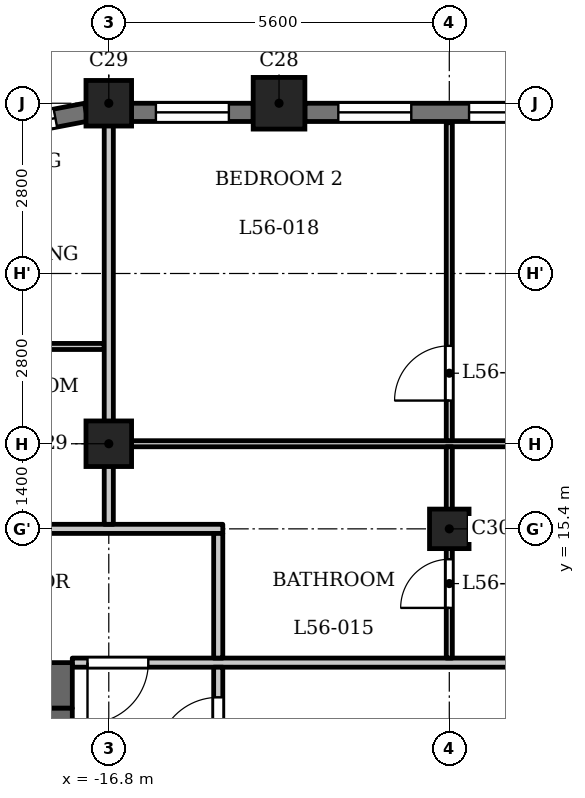
"""IFC4 building model, lengths in metres.
Left out: names, types, materials, properties, quantities, classifications, styles, units other than length and angle.
Written with IfcOpenShell. Run it as: python <this file> out.ifc"""

import sys

from ifc_helpers import new_model, si_unit, direction, frame, frame_2d, origin, origin_2d, place, context, subcontext, project, spatial, rectangle, extrude, element, fill, save


model = new_model("IFC4")
c1 = context("Model", 3, precision=1e-05, world=origin(), true_north=direction((0.0, 1.0)))
c2 = subcontext(c1, "Body", "Model", "MODEL_VIEW")
j1 = project(units=[si_unit("LENGTHUNIT", "METRE"), si_unit("PLANEANGLEUNIT", "RADIAN")], contexts=[c1])
p1 = place(None, origin())
s1 = spatial("IfcSite", under=j1, at=p1, CompositionType="ELEMENT")
p2 = place(p1, origin())
s2 = spatial("IfcBuilding", under=s1, at=p2, CompositionType="ELEMENT")
p3 = place(p2, frame((0.0, 0.0, 216.9)))
s3 = spatial("IfcBuildingStorey", under=s2, at=p3, CompositionType="ELEMENT", Elevation=216.9)
p4 = place(p3, frame((-14.0, 22.4, 0.0), z_axis=(0.0, 0.0, 1.0), x_axis=(1.0, 0.0, 0.0)))
e1 = element("IfcColumn", 1, at=p4, inside=s3, PredefinedType="COLUMN", context=c2, shape_type="SweptSolid", body=[
    extrude(rectangle(XDim=0.85, YDim=0.85, at=origin_2d()), origin(), (0.0, 0.0, 1.0), 3.5),
])
for number, where, z_axis, x_axis in (
    (2, (-16.8, 16.8, 0.0), (0.0, 0.0, 1.0), (1.0, 0.0, 0.0)),
    (3, (-16.8, 22.4, 0.0), (0.0, 0.0, 1.0), (1.0, 0.0, 0.0)),
):
    element("IfcColumn", number, at=place(p3, frame(where, z_axis=z_axis, x_axis=x_axis)), inside=s3, PredefinedType="COLUMN", context=c2, shape_type="SweptSolid", body=[
        extrude(rectangle(XDim=0.75, YDim=0.75, at=origin_2d()), origin(), (0.0, 0.0, 1.0), 3.5),
    ])
p5 = place(p3, frame((-11.2, 15.4, 0.0), z_axis=(0.0, 0.0, 1.0), x_axis=(1.0, 0.0, 0.0)))
e4 = element("IfcColumn", 4, at=p5, inside=s3, PredefinedType="COLUMN", context=c2, shape_type="SweptSolid", body=[
    extrude(rectangle(XDim=0.65, YDim=0.65, at=origin_2d()), origin(), (0.0, 0.0, 1.0), 3.5),
])
p6 = place(p3, frame((-8.825, 22.25, 0.0), z_axis=(0.0, 0.0, 1.0), x_axis=(-1.0, 0.0, 0.0)))
e5 = element("IfcWall", 5, at=p6, inside=s3, PredefinedType="SOLIDWALL", context=c2, shape_type="SweptSolid", body=[
    extrude(rectangle(XDim=4.75, YDim=0.3, at=frame_2d((2.375, 0.0))), origin(), (0.0, 0.0, 1.0), 2.5),
])
p7 = place(p6, frame((0.25, 0.0, 0.9)))
e6 = element("IfcOpeningElement", 6, at=p7, cuts=e5, PredefinedType="OPENING", context=c2, shape_type="SweptSolid", body=[
    extrude(rectangle(XDim=1.8, YDim=1.25, at=frame_2d((0.9, 0.625))), frame((0.0, 0.16, 0.0), z_axis=(0.0, -1.0, 0.0), x_axis=(1.0, 0.0, 0.0)), (0.0, 0.0, 1.0), 0.32),
])
p8 = place(p6, frame((3.0, 0.0, 0.6)))
e7 = element("IfcOpeningElement", 7, at=p8, cuts=e5, PredefinedType="OPENING", context=c2, shape_type="SweptSolid", body=[
    extrude(rectangle(XDim=1.2, YDim=1.55, at=frame_2d((0.6, 0.775))), frame((0.0, 0.16, 0.0), z_axis=(0.0, -1.0, 0.0), x_axis=(1.0, 0.0, 0.0)), (0.0, 0.0, 1.0), 0.32),
])
p9 = place(p3, frame((-14.425, 22.25, 0.0), z_axis=(0.0, 0.0, 1.0), x_axis=(-1.0, 0.0, 0.0)))
e8 = element("IfcWall", 8, at=p9, inside=s3, PredefinedType="SOLIDWALL", context=c2, shape_type="SweptSolid", body=[
    extrude(rectangle(XDim=2.0, YDim=0.3, at=frame_2d((1.0, 0.0))), origin(), (0.0, 0.0, 1.0), 2.5),
])
p10 = place(p9, frame((0.4, 0.0, 0.6)))
e9 = element("IfcOpeningElement", 9, at=p10, cuts=e8, PredefinedType="OPENING", context=c2, shape_type="SweptSolid", body=[
    extrude(rectangle(XDim=1.2, YDim=1.55, at=frame_2d((0.6, 0.775))), frame((0.0, 0.16, 0.0), z_axis=(0.0, -1.0, 0.0), x_axis=(1.0, 0.0, 0.0)), (0.0, 0.0, 1.0), 0.32),
])
p11 = place(p3, frame((-17.172, 22.253, 0.0), z_axis=(0.0, 0.0, 1.0), x_axis=(-0.982300037503, -0.187314271538, 0.0)))
e10 = element("IfcWall", 10, at=p11, inside=s3, PredefinedType="SOLIDWALL", context=c2, shape_type="SweptSolid", body=[
    extrude(rectangle(XDim=1.831, YDim=0.3, at=frame_2d((0.916, 0.0))), origin(), (0.0, 0.0, 1.0), 2.5),
])
p12 = place(p11, frame((0.516, 0.0, 0.6)))
e11 = element("IfcOpeningElement", 11, at=p12, cuts=e10, PredefinedType="OPENING", context=c2, shape_type="SweptSolid", body=[
    extrude(rectangle(XDim=0.8, YDim=1.55, at=frame_2d((0.4, 0.775))), frame((0.0, 0.16, 0.0), z_axis=(0.0, -1.0, 0.0), x_axis=(1.0, 0.0, 0.0)), (0.0, 0.0, 1.0), 0.32),
])
p13 = place(p3, frame((-17.4, 12.825, 0.0), z_axis=(0.0, 0.0, 1.0), x_axis=(-1.0, 0.0, 0.0)))
e12 = element("IfcWall", 12, at=p13, inside=s3, PredefinedType="SHEAR", context=c2, shape_type="SweptSolid", body=[
    extrude(rectangle(XDim=7.6, YDim=0.75, at=frame_2d((3.8, 0.0))), origin(), (0.0, 0.0, 1.0), 3.2),
])
p14 = place(p3, frame((-17.6, -12.45, 0.0), z_axis=(0.0, 0.0, 1.0), x_axis=(0.0, 1.0, 0.0)))
e13 = element("IfcWall", 13, at=p14, inside=s3, PredefinedType="SHEAR", context=c2, shape_type="SweptSolid", body=[
    extrude(rectangle(XDim=24.9, YDim=0.4, at=frame_2d((12.45, 0.0))), origin(), (0.0, 0.0, 1.0), 3.2),
])
p15 = place(p14, frame((6.85, 0.0, 0.0)))
e14 = element("IfcOpeningElement", 14, at=p15, cuts=e13, PredefinedType="OPENING", context=c2, shape_type="SweptSolid", body=[
    extrude(rectangle(XDim=0.9, YDim=2.1, at=frame_2d((0.45, 1.05))), frame((0.0, 0.21, 0.0), z_axis=(0.0, -1.0, 0.0), x_axis=(1.0, 0.0, 0.0)), (0.0, 0.0, 1.0), 0.42),
])
p16 = place(p14, frame((10.45, 0.0, 0.0)))
e15 = element("IfcOpeningElement", 15, at=p16, cuts=e13, PredefinedType="OPENING", context=c2, shape_type="SweptSolid", body=[
    extrude(rectangle(XDim=0.9, YDim=2.1, at=frame_2d((0.45, 1.05))), frame((0.0, 0.21, 0.0), z_axis=(0.0, -1.0, 0.0), x_axis=(1.0, 0.0, 0.0)), (0.0, 0.0, 1.0), 0.42),
])
p17 = place(p14, frame((15.6, 0.0, 0.0)))
e16 = element("IfcOpeningElement", 16, at=p17, cuts=e13, PredefinedType="OPENING", context=c2, shape_type="SweptSolid", body=[
    extrude(rectangle(XDim=1.1, YDim=2.1, at=frame_2d((0.55, 1.05))), frame((0.0, 0.21, 0.0), z_axis=(0.0, -1.0, 0.0), x_axis=(1.0, 0.0, 0.0)), (0.0, 0.0, 1.0), 0.42),
])
p18 = place(p14, frame((18.0, 0.0, 0.0)))
e17 = element("IfcOpeningElement", 17, at=p18, cuts=e13, PredefinedType="OPENING", context=c2, shape_type="SweptSolid", body=[
    extrude(rectangle(XDim=1.1, YDim=2.1, at=frame_2d((0.55, 1.05))), frame((0.0, 0.21, 0.0), z_axis=(0.0, -1.0, 0.0), x_axis=(1.0, 0.0, 0.0)), (0.0, 0.0, 1.0), 0.42),
])
p19 = place(p14, frame((23.025, 0.0, 0.0)))
e18 = element("IfcOpeningElement", 18, at=p19, cuts=e13, PredefinedType="OPENING", context=c2, shape_type="SweptSolid", body=[
    extrude(rectangle(XDim=1.1, YDim=2.1, at=frame_2d((0.55, 1.05))), frame((0.0, 0.21, 0.0), z_axis=(0.0, -1.0, 0.0), x_axis=(1.0, 0.0, 0.0)), (0.0, 0.0, 1.0), 0.42),
])
p20 = place(p14, frame((0.775, 0.0, 0.0)))
e19 = element("IfcOpeningElement", 19, at=p20, cuts=e13, PredefinedType="OPENING", context=c2, shape_type="SweptSolid", body=[
    extrude(rectangle(XDim=1.1, YDim=2.1, at=frame_2d((0.55, 1.05))), frame((0.0, 0.21, 0.0), z_axis=(0.0, -1.0, 0.0), x_axis=(1.0, 0.0, 0.0)), (0.0, 0.0, 1.0), 0.42),
])
p21 = place(p14, frame((12.925, 0.0, 0.0)))
e20 = element("IfcOpeningElement", 20, at=p21, cuts=e13, PredefinedType="OPENING", context=c2, shape_type="SweptSolid", body=[
    extrude(rectangle(XDim=1.8, YDim=2.1, at=frame_2d((0.9, 1.05))), frame((0.0, 0.21, 0.0), z_axis=(0.0, -1.0, 0.0), x_axis=(1.0, 0.0, 0.0)), (0.0, 0.0, 1.0), 0.42),
])
p22 = place(p3, frame((-17.4, 13.2, 0.0), z_axis=(0.0, 0.0, 1.0), x_axis=(1.0, 0.0, 0.0)))
e21 = element("IfcWall", 21, at=p22, inside=s3, PredefinedType="PARTITIONING", context=c2, shape_type="SweptSolid", body=[
    extrude(rectangle(XDim=34.8, YDim=0.15, at=frame_2d((17.4, 0.0))), origin(), (0.0, 0.0, 1.0), 3.2),
])
p23 = place(p22, frame((0.25, 0.0, 0.0)))
e22 = element("IfcOpeningElement", 22, at=p23, cuts=e21, PredefinedType="OPENING", context=c2, shape_type="SweptSolid", body=[
    extrude(rectangle(XDim=1.0, YDim=2.1, at=frame_2d((0.5, 1.05))), frame((0.0, 0.085, 0.0), z_axis=(0.0, -1.0, 0.0), x_axis=(1.0, 0.0, 0.0)), (0.0, 0.0, 1.0), 0.17),
])
p24 = place(p22, frame((33.65, 0.0, 0.0)))
e23 = element("IfcOpeningElement", 23, at=p24, cuts=e21, PredefinedType="OPENING", context=c2, shape_type="SweptSolid", body=[
    extrude(rectangle(XDim=1.0, YDim=2.1, at=frame_2d((0.5, 1.05))), frame((0.0, 0.085, 0.0), z_axis=(0.0, -1.0, 0.0), x_axis=(1.0, 0.0, 0.0)), (0.0, 0.0, 1.0), 0.17),
])
p25 = place(p22, frame((15.75, 0.0, 0.0)))
e24 = element("IfcOpeningElement", 24, at=p25, cuts=e21, PredefinedType="OPENING", context=c2, shape_type="SweptSolid", body=[
    extrude(rectangle(XDim=1.0, YDim=2.1, at=frame_2d((0.5, 1.05))), frame((0.0, 0.085, 0.0), z_axis=(0.0, -1.0, 0.0), x_axis=(1.0, 0.0, 0.0)), (0.0, 0.0, 1.0), 0.17),
])
p26 = place(p22, frame((26.95, 0.0, 0.0)))
e25 = element("IfcOpeningElement", 25, at=p26, cuts=e21, PredefinedType="OPENING", context=c2, shape_type="SweptSolid", body=[
    extrude(rectangle(XDim=1.0, YDim=2.1, at=frame_2d((0.5, 1.05))), frame((0.0, 0.085, 0.0), z_axis=(0.0, -1.0, 0.0), x_axis=(1.0, 0.0, 0.0)), (0.0, 0.0, 1.0), 0.17),
])
p27 = place(p22, frame((29.75, 0.0, 0.0)))
e26 = element("IfcOpeningElement", 26, at=p27, cuts=e21, PredefinedType="OPENING", context=c2, shape_type="SweptSolid", body=[
    extrude(rectangle(XDim=1.0, YDim=2.1, at=frame_2d((0.5, 1.05))), frame((0.0, 0.085, 0.0), z_axis=(0.0, -1.0, 0.0), x_axis=(1.0, 0.0, 0.0)), (0.0, 0.0, 1.0), 0.17),
])
p28 = place(p3, frame((-24.684, 15.4, 0.0), z_axis=(0.0, 0.0, 1.0), x_axis=(1.0, 0.0, 0.0)))
e27 = element("IfcWall", 27, at=p28, inside=s3, PredefinedType="PARTITIONING", context=c2, shape_type="SweptSolid", body=[
    extrude(rectangle(XDim=9.759, YDim=0.15, at=frame_2d((4.879, 0.0))), origin(), (0.0, 0.0, 1.0), 3.2),
])
p29 = place(p28, frame((0.984, 0.0, 0.0)))
e28 = element("IfcOpeningElement", 28, at=p29, cuts=e27, PredefinedType="OPENING", context=c2, shape_type="SweptSolid", body=[
    extrude(rectangle(XDim=1.0, YDim=2.1, at=frame_2d((0.5, 1.05))), frame((0.0, 0.085, 0.0), z_axis=(0.0, -1.0, 0.0), x_axis=(1.0, 0.0, 0.0)), (0.0, 0.0, 1.0), 0.17),
])
p30 = place(p3, frame((-16.725, 16.8, 0.0), z_axis=(0.0, 0.0, 1.0), x_axis=(1.0, 0.0, 0.0)))
e29 = element("IfcWall", 29, at=p30, inside=s3, PredefinedType="PARTITIONING", context=c2, shape_type="SweptSolid", body=[
    extrude(rectangle(XDim=33.45, YDim=0.1, at=frame_2d((16.725, 0.0))), origin(), (0.0, 0.0, 1.0), 3.2),
])
p31 = place(p30, frame((11.675, 0.0, 0.0)))
e30 = element("IfcOpeningElement", 30, at=p31, cuts=e29, PredefinedType="OPENING", context=c2, shape_type="SweptSolid", body=[
    extrude(rectangle(XDim=0.9, YDim=2.1, at=frame_2d((0.45, 1.05))), frame((0.0, 0.06, 0.0), z_axis=(0.0, -1.0, 0.0), x_axis=(1.0, 0.0, 0.0)), (0.0, 0.0, 1.0), 0.12),
])
p32 = place(p30, frame((9.575, 0.0, 0.0)))
e31 = element("IfcOpeningElement", 31, at=p32, cuts=e29, PredefinedType="OPENING", context=c2, shape_type="SweptSolid", body=[
    extrude(rectangle(XDim=0.9, YDim=2.1, at=frame_2d((0.45, 1.05))), frame((0.0, 0.06, 0.0), z_axis=(0.0, -1.0, 0.0), x_axis=(1.0, 0.0, 0.0)), (0.0, 0.0, 1.0), 0.12),
])
p33 = place(p30, frame((17.375, 0.0, 0.0)))
e32 = element("IfcOpeningElement", 32, at=p33, cuts=e29, PredefinedType="OPENING", context=c2, shape_type="SweptSolid", body=[
    extrude(rectangle(XDim=0.8, YDim=2.1, at=frame_2d((0.4, 1.05))), frame((0.0, 0.06, 0.0), z_axis=(0.0, -1.0, 0.0), x_axis=(1.0, 0.0, 0.0)), (0.0, 0.0, 1.0), 0.12),
])
p34 = place(p30, frame((19.525, 0.0, 0.0)))
e33 = element("IfcOpeningElement", 33, at=p34, cuts=e29, PredefinedType="OPENING", context=c2, shape_type="SweptSolid", body=[
    extrude(rectangle(XDim=0.9, YDim=2.1, at=frame_2d((0.45, 1.05))), frame((0.0, 0.06, 0.0), z_axis=(0.0, -1.0, 0.0), x_axis=(1.0, 0.0, 0.0)), (0.0, 0.0, 1.0), 0.12),
])
p35 = place(p30, frame((23.775, 0.0, 0.0)))
e34 = element("IfcOpeningElement", 34, at=p35, cuts=e29, PredefinedType="OPENING", context=c2, shape_type="SweptSolid", body=[
    extrude(rectangle(XDim=0.9, YDim=2.1, at=frame_2d((0.45, 1.05))), frame((0.0, 0.06, 0.0), z_axis=(0.0, -1.0, 0.0), x_axis=(1.0, 0.0, 0.0)), (0.0, 0.0, 1.0), 0.12),
])
p36 = place(p30, frame((26.125, 0.0, 0.0)))
e35 = element("IfcOpeningElement", 35, at=p36, cuts=e29, PredefinedType="OPENING", context=c2, shape_type="SweptSolid", body=[
    extrude(rectangle(XDim=0.9, YDim=2.1, at=frame_2d((0.45, 1.05))), frame((0.0, 0.06, 0.0), z_axis=(0.0, -1.0, 0.0), x_axis=(1.0, 0.0, 0.0)), (0.0, 0.0, 1.0), 0.12),
])
p37 = place(p30, frame((32.075, 0.0, 0.0)))
e36 = element("IfcOpeningElement", 36, at=p37, cuts=e29, PredefinedType="OPENING", context=c2, shape_type="SweptSolid", body=[
    extrude(rectangle(XDim=0.8, YDim=2.1, at=frame_2d((0.4, 1.05))), frame((0.0, 0.06, 0.0), z_axis=(0.0, -1.0, 0.0), x_axis=(1.0, 0.0, 0.0)), (0.0, 0.0, 1.0), 0.12),
])
p38 = place(p30, frame((29.175, 0.0, 0.0)))
e37 = element("IfcOpeningElement", 37, at=p38, cuts=e29, PredefinedType="OPENING", context=c2, shape_type="SweptSolid", body=[
    extrude(rectangle(XDim=0.9, YDim=2.1, at=frame_2d((0.45, 1.05))), frame((0.0, 0.06, 0.0), z_axis=(0.0, -1.0, 0.0), x_axis=(1.0, 0.0, 0.0)), (0.0, 0.0, 1.0), 0.12),
])
p39 = place(p3, frame((-23.43, 18.4, 0.0), z_axis=(0.0, 0.0, 1.0), x_axis=(1.0, 0.0, 0.0)))
e38 = element("IfcWall", 38, at=p39, inside=s3, PredefinedType="PARTITIONING", context=c2, shape_type="SweptSolid", body=[
    extrude(rectangle(XDim=6.555, YDim=0.1, at=frame_2d((3.277, 0.0))), origin(), (0.0, 0.0, 1.0), 3.2),
])
p40 = place(p39, frame((4.28, 0.0, 0.0)))
e39 = element("IfcOpeningElement", 39, at=p40, cuts=e38, PredefinedType="OPENING", context=c2, shape_type="SweptSolid", body=[
    extrude(rectangle(XDim=0.8, YDim=2.1, at=frame_2d((0.4, 1.05))), frame((0.0, 0.06, 0.0), z_axis=(0.0, -1.0, 0.0), x_axis=(1.0, 0.0, 0.0)), (0.0, 0.0, 1.0), 0.12),
])
p41 = place(p39, frame((1.33, 0.0, 0.0)))
e40 = element("IfcOpeningElement", 40, at=p41, cuts=e38, PredefinedType="OPENING", context=c2, shape_type="SweptSolid", body=[
    extrude(rectangle(XDim=0.9, YDim=2.1, at=frame_2d((0.45, 1.05))), frame((0.0, 0.06, 0.0), z_axis=(0.0, -1.0, 0.0), x_axis=(1.0, 0.0, 0.0)), (0.0, 0.0, 1.0), 0.12),
])
p42 = place(p3, frame((-16.8, 15.475, 0.0), z_axis=(0.0, 0.0, 1.0), x_axis=(0.0, 1.0, 0.0)))
e41 = element("IfcWall", 41, at=p42, inside=s3, PredefinedType="PARTITIONING", context=c2, shape_type="SweptSolid", body=[
    extrude(rectangle(XDim=6.835, YDim=0.15, at=frame_2d((3.417, 0.0))), origin(), (0.0, 0.0, 1.0), 2.55),
])
p43 = place(p3, frame((-15.0, 6.769, 0.0), z_axis=(0.0, 0.0, 1.0), x_axis=(0.0, 1.0, 0.0)))
e42 = element("IfcWall", 42, at=p43, inside=s3, PredefinedType="PARTITIONING", context=c2, shape_type="SweptSolid", body=[
    extrude(rectangle(XDim=6.356, YDim=0.15, at=frame_2d((3.178, 0.0))), origin(), (0.0, 0.0, 1.0), 3.2),
])
p44 = place(p43, frame((4.86, 0.0, 0.0)))
e43 = element("IfcOpeningElement", 43, at=p44, cuts=e42, PredefinedType="OPENING", context=c2, shape_type="SweptSolid", body=[
    extrude(rectangle(XDim=1.0, YDim=2.1, at=frame_2d((0.5, 1.05))), frame((0.0, 0.085, 0.0), z_axis=(0.0, -1.0, 0.0), x_axis=(1.0, 0.0, 0.0)), (0.0, 0.0, 1.0), 0.17),
])
p45 = place(p3, frame((-15.0, 13.275, 0.0), z_axis=(0.0, 0.0, 1.0), x_axis=(0.0, 1.0, 0.0)))
e44 = element("IfcWall", 44, at=p45, inside=s3, PredefinedType="PARTITIONING", context=c2, shape_type="SweptSolid", body=[
    extrude(rectangle(XDim=2.05, YDim=0.15, at=frame_2d((1.025, 0.0))), origin(), (0.0, 0.0, 1.0), 3.2),
])
p46 = place(p3, frame((-11.2, 13.275, 0.0), z_axis=(0.0, 0.0, 1.0), x_axis=(0.0, 1.0, 0.0)))
e45 = element("IfcWall", 45, at=p46, inside=s3, PredefinedType="PARTITIONING", context=c2, shape_type="SweptSolid", body=[
    extrude(rectangle(XDim=3.475, YDim=0.1, at=frame_2d((1.738, 0.0))), origin(), (0.0, 0.0, 1.0), 3.2),
])
p47 = place(p46, frame((0.825, 0.0, 0.0)))
e46 = element("IfcOpeningElement", 46, at=p47, cuts=e45, PredefinedType="OPENING", context=c2, shape_type="SweptSolid", body=[
    extrude(rectangle(XDim=0.8, YDim=2.1, at=frame_2d((0.4, 1.05))), frame((0.0, 0.06, 0.0), z_axis=(0.0, -1.0, 0.0), x_axis=(1.0, 0.0, 0.0)), (0.0, 0.0, 1.0), 0.12),
])
p48 = place(p3, frame((-11.2, 16.85, 0.0), z_axis=(0.0, 0.0, 1.0), x_axis=(0.0, 1.0, 0.0)))
e47 = element("IfcWall", 47, at=p48, inside=s3, PredefinedType="PARTITIONING", context=c2, shape_type="SweptSolid", body=[
    extrude(rectangle(XDim=5.23, YDim=0.1, at=frame_2d((2.615, 0.0))), origin(), (0.0, 0.0, 1.0), 3.2),
])
p49 = place(p48, frame((0.66, 0.0, 0.0)))
e48 = element("IfcOpeningElement", 48, at=p49, cuts=e47, PredefinedType="OPENING", context=c2, shape_type="SweptSolid", body=[
    extrude(rectangle(XDim=0.9, YDim=2.1, at=frame_2d((0.45, 1.05))), frame((0.0, 0.06, 0.0), z_axis=(0.0, -1.0, 0.0), x_axis=(1.0, 0.0, 0.0)), (0.0, 0.0, 1.0), 0.12),
])
p50 = place(p44, origin())
e49 = element("IfcDoor", 49, at=p50, inside=s3, OperationType="SINGLE_SWING_RIGHT", PredefinedType="DOOR", context=c2, shape_type="SweptSolid", body=[
    extrude(rectangle(XDim=1.0, YDim=2.1, at=frame_2d((0.5, 1.05))), frame((0.0, 0.025, 0.0), z_axis=(0.0, -1.0, 0.0), x_axis=(1.0, 0.0, 0.0)), (0.0, 0.0, 1.0), 0.05),
])
fill(e43, e49)
p51 = place(p23, origin())
e50 = element("IfcDoor", 50, at=p51, inside=s3, OperationType="SINGLE_SWING_LEFT", PredefinedType="DOOR", context=c2, shape_type="SweptSolid", body=[
    extrude(rectangle(XDim=1.0, YDim=2.1, at=frame_2d((0.5, 1.05))), frame((0.0, 0.025, 0.0), z_axis=(0.0, -1.0, 0.0), x_axis=(1.0, 0.0, 0.0)), (0.0, 0.0, 1.0), 0.05),
])
fill(e22, e50)
p52 = place(p47, origin())
e51 = element("IfcDoor", 51, at=p52, inside=s3, OperationType="SINGLE_SWING_RIGHT", PredefinedType="DOOR", context=c2, shape_type="SweptSolid", body=[
    extrude(rectangle(XDim=0.8, YDim=2.1, at=frame_2d((0.4, 1.05))), frame((0.0, 0.025, 0.0), z_axis=(0.0, -1.0, 0.0), x_axis=(1.0, 0.0, 0.0)), (0.0, 0.0, 1.0), 0.05),
])
fill(e46, e51)
p53 = place(p49, origin())
e52 = element("IfcDoor", 52, at=p53, inside=s3, OperationType="SINGLE_SWING_RIGHT", PredefinedType="DOOR", context=c2, shape_type="SweptSolid", body=[
    extrude(rectangle(XDim=0.9, YDim=2.1, at=frame_2d((0.45, 1.05))), frame((0.0, 0.025, 0.0), z_axis=(0.0, -1.0, 0.0), x_axis=(1.0, 0.0, 0.0)), (0.0, 0.0, 1.0), 0.05),
])
fill(e48, e52)
p54 = place(p7, origin())
e53 = element("IfcWindow", 53, at=p54, inside=s3, PartitioningType="SINGLE_PANEL", PredefinedType="WINDOW", context=c2, shape_type="SweptSolid", body=[
    extrude(rectangle(XDim=1.8, YDim=1.25, at=frame_2d((0.9, 0.625))), frame((0.0, 0.03, 0.0), z_axis=(0.0, -1.0, 0.0), x_axis=(1.0, 0.0, 0.0)), (0.0, 0.0, 1.0), 0.06),
])
fill(e6, e53)
p55 = place(p8, origin())
e54 = element("IfcWindow", 54, at=p55, inside=s3, PartitioningType="SINGLE_PANEL", PredefinedType="WINDOW", context=c2, shape_type="SweptSolid", body=[
    extrude(rectangle(XDim=1.2, YDim=1.55, at=frame_2d((0.6, 0.775))), frame((0.0, 0.03, 0.0), z_axis=(0.0, -1.0, 0.0), x_axis=(1.0, 0.0, 0.0)), (0.0, 0.0, 1.0), 0.06),
])
fill(e7, e54)
p56 = place(p10, origin())
e55 = element("IfcWindow", 55, at=p56, inside=s3, PartitioningType="SINGLE_PANEL", PredefinedType="WINDOW", context=c2, shape_type="SweptSolid", body=[
    extrude(rectangle(XDim=1.2, YDim=1.55, at=frame_2d((0.6, 0.775))), frame((0.0, 0.03, 0.0), z_axis=(0.0, -1.0, 0.0), x_axis=(1.0, 0.0, 0.0)), (0.0, 0.0, 1.0), 0.06),
])
fill(e9, e55)
p57 = place(p12, origin())
e56 = element("IfcWindow", 56, at=p57, inside=s3, PartitioningType="SINGLE_PANEL", PredefinedType="WINDOW", context=c2, shape_type="SweptSolid", body=[
    extrude(rectangle(XDim=0.8, YDim=1.55, at=frame_2d((0.4, 0.775))), frame((0.0, 0.03, 0.0), z_axis=(0.0, -1.0, 0.0), x_axis=(1.0, 0.0, 0.0)), (0.0, 0.0, 1.0), 0.06),
])
fill(e11, e56)
save(model, sys.argv[1])
